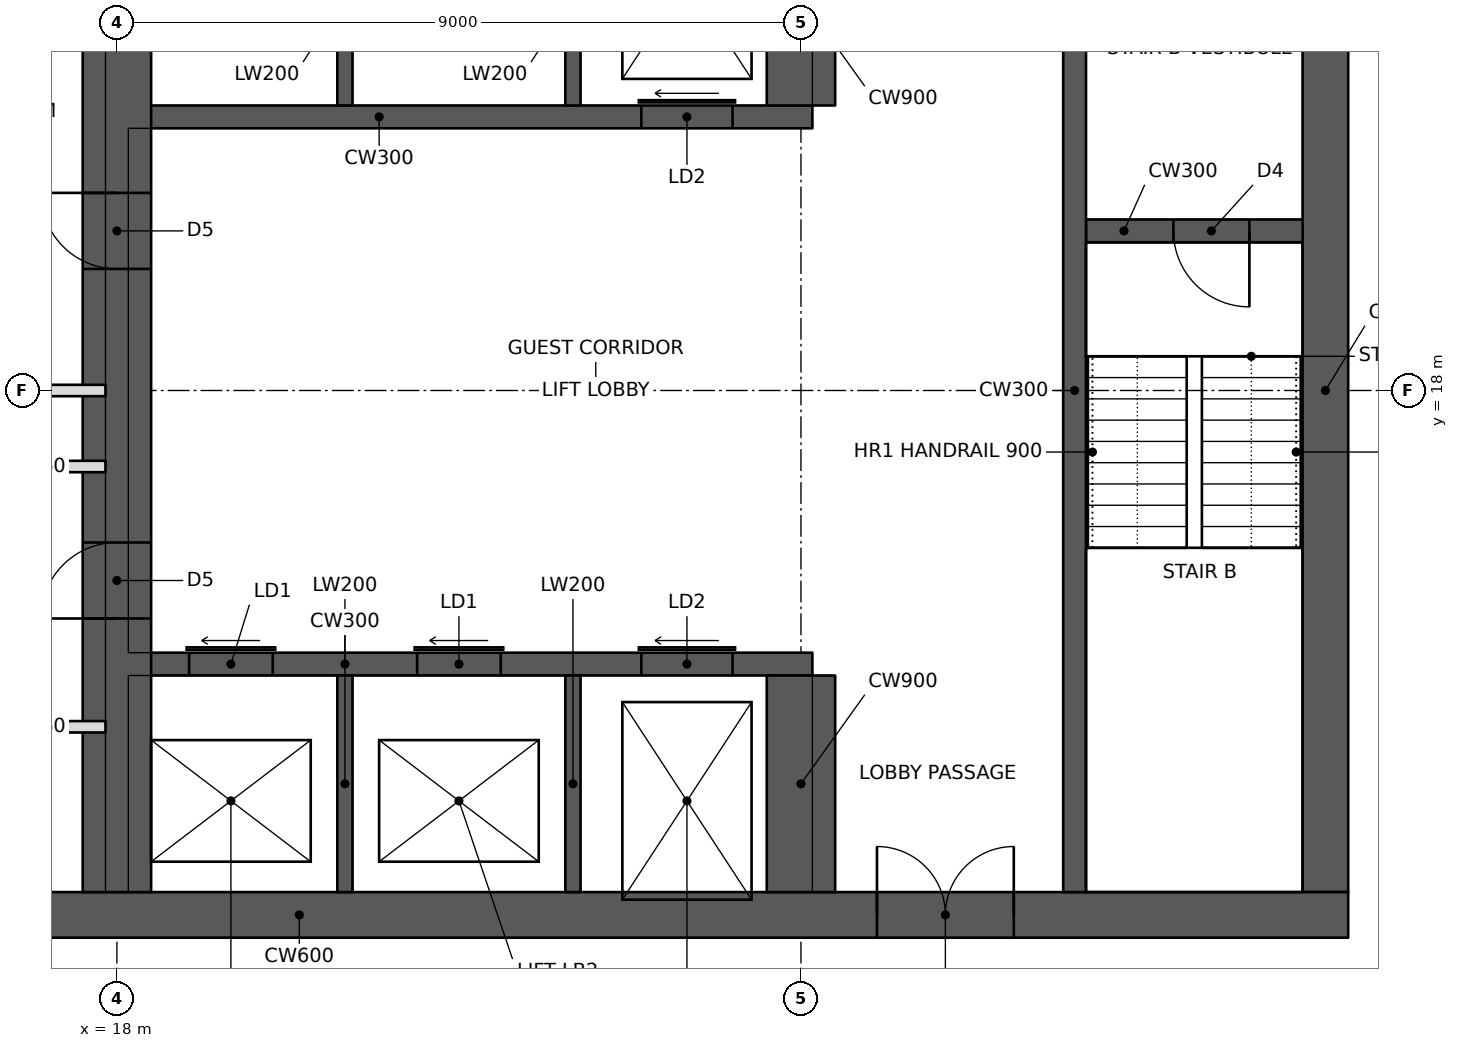
"""IFC4 building model, lengths in metres.
Left out: names, types, materials, properties, quantities, classifications, styles, units other than length and angle.
Written with IfcOpenShell. Run it as: python <this file> out.ifc"""

import sys

from ifc_helpers import new_model, si_unit, direction, frame, frame_2d, origin, place, context, subcontext, project, spatial, rectangle, extrude, element, fill, save


model = new_model("IFC4")
c1 = context("Model", 3, precision=1e-05, world=origin(), true_north=direction((0.0, 1.0)))
c2 = subcontext(c1, "Body", "Model", "MODEL_VIEW")
j1 = project(units=[si_unit("LENGTHUNIT", "METRE"), si_unit("PLANEANGLEUNIT", "RADIAN")], contexts=[c1])
p1 = place(None, origin())
s1 = spatial("IfcSite", under=j1, at=p1, CompositionType="ELEMENT")
p2 = place(p1, origin())
s2 = spatial("IfcBuilding", under=s1, at=p2, CompositionType="ELEMENT")
p3 = place(p2, frame((0.0, 0.0, 152.0)))
s3 = spatial("IfcBuildingStorey", under=s2, at=p3, CompositionType="ELEMENT", Elevation=152.0)
p4 = place(p3, frame((10.8, 11.1, 0.0), z_axis=(0.0, 0.0, 1.0), x_axis=(1.0, 0.0, 0.0)))
e1 = element("IfcWall", 1, at=p4, inside=s3, PredefinedType="SHEAR", context=c2, shape_type="SweptSolid", body=[
    extrude(rectangle(XDim=23.4, YDim=0.6, at=frame_2d((11.7, 0.0))), origin(), (0.0, 0.0, 1.0), 3.4),
])
p5 = place(p4, frame((1.0, 0.0, 0.0)))
e2 = element("IfcOpeningElement", 2, at=p5, cuts=e1, PredefinedType="OPENING", context=c2, shape_type="SweptSolid", body=[
    extrude(rectangle(XDim=1.0, YDim=2.1, at=frame_2d((0.5, 1.05))), frame((0.0, 0.31, 0.0), z_axis=(0.0, -1.0, 0.0), x_axis=(1.0, 0.0, 0.0)), (0.0, 0.0, 1.0), 0.62),
])
p6 = place(p4, frame((17.2, 0.0, 0.0)))
e3 = element("IfcOpeningElement", 3, at=p6, cuts=e1, PredefinedType="OPENING", context=c2, shape_type="SweptSolid", body=[
    extrude(rectangle(XDim=1.8, YDim=2.1, at=frame_2d((0.9, 1.05))), frame((0.0, 0.31, 0.0), z_axis=(0.0, -1.0, 0.0), x_axis=(1.0, 0.0, 0.0)), (0.0, 0.0, 1.0), 0.62),
])
p7 = place(p3, frame((33.9, 11.4, 0.0), z_axis=(0.0, 0.0, 1.0), x_axis=(0.0, 1.0, 0.0)))
e4 = element("IfcWall", 4, at=p7, inside=s3, PredefinedType="SHEAR", context=c2, shape_type="SweptSolid", body=[
    extrude(rectangle(XDim=13.2, YDim=0.6, at=frame_2d((6.6, 0.0))), origin(), (0.0, 0.0, 1.0), 3.4),
])
p8 = place(p3, frame((18.0, 11.4, 0.0), z_axis=(0.0, 0.0, 1.0), x_axis=(0.0, 1.0, 0.0)))
e5 = element("IfcWall", 5, at=p8, inside=s3, PredefinedType="SHEAR", context=c2, shape_type="SweptSolid", body=[
    extrude(rectangle(XDim=13.2, YDim=0.9, at=frame_2d((6.6, 0.0))), origin(), (0.0, 0.0, 1.0), 3.4),
])
p9 = place(p8, frame((3.6, 0.0, 0.0)))
e6 = element("IfcOpeningElement", 6, at=p9, cuts=e5, PredefinedType="OPENING", context=c2, shape_type="SweptSolid", body=[
    extrude(rectangle(XDim=1.0, YDim=2.1, at=frame_2d((0.5, 1.05))), frame((0.0, 0.46, 0.0), z_axis=(0.0, -1.0, 0.0), x_axis=(1.0, 0.0, 0.0)), (0.0, 0.0, 1.0), 0.92),
])
p10 = place(p8, frame((8.2, 0.0, 0.0)))
e7 = element("IfcOpeningElement", 7, at=p10, cuts=e5, PredefinedType="OPENING", context=c2, shape_type="SweptSolid", body=[
    extrude(rectangle(XDim=1.0, YDim=2.1, at=frame_2d((0.5, 1.05))), frame((0.0, 0.46, 0.0), z_axis=(0.0, -1.0, 0.0), x_axis=(1.0, 0.0, 0.0)), (0.0, 0.0, 1.0), 0.92),
])
p11 = place(p3, frame((14.55, 18.0, 0.0), z_axis=(0.0, 0.0, 1.0), x_axis=(1.0, 0.0, 0.0)))
e8 = element("IfcWall", 8, at=p11, inside=s3, PredefinedType="PARTITIONING", context=c2, shape_type="SweptSolid", body=[
    extrude(rectangle(XDim=3.3, YDim=0.15, at=frame_2d((1.65, 0.0))), origin(), (0.0, 0.0, 1.0), 3.15),
])
p12 = place(p3, frame((18.15, 14.4, 0.0), z_axis=(0.0, 0.0, 1.0), x_axis=(1.0, 0.0, 0.0)))
e9 = element("IfcWall", 9, at=p12, inside=s3, PredefinedType="SHEAR", context=c2, shape_type="SweptSolid", body=[
    extrude(rectangle(XDim=9.0, YDim=0.3, at=frame_2d((4.5, 0.0))), origin(), (0.0, 0.0, 1.0), 3.4),
])
p13 = place(p12, frame((0.8, 0.0, 0.0)))
e10 = element("IfcOpeningElement", 10, at=p13, cuts=e9, PredefinedType="OPENING", context=c2, shape_type="SweptSolid", body=[
    extrude(rectangle(XDim=1.1, YDim=2.1, at=frame_2d((0.55, 1.05))), frame((0.0, 0.16, 0.0), z_axis=(0.0, -1.0, 0.0), x_axis=(1.0, 0.0, 0.0)), (0.0, 0.0, 1.0), 0.32),
])
p14 = place(p12, frame((3.8, 0.0, 0.0)))
e11 = element("IfcOpeningElement", 11, at=p14, cuts=e9, PredefinedType="OPENING", context=c2, shape_type="SweptSolid", body=[
    extrude(rectangle(XDim=1.1, YDim=2.1, at=frame_2d((0.55, 1.05))), frame((0.0, 0.16, 0.0), z_axis=(0.0, -1.0, 0.0), x_axis=(1.0, 0.0, 0.0)), (0.0, 0.0, 1.0), 0.32),
])
p15 = place(p12, frame((6.75, 0.0, 0.0)))
e12 = element("IfcOpeningElement", 12, at=p15, cuts=e9, PredefinedType="OPENING", context=c2, shape_type="SweptSolid", body=[
    extrude(rectangle(XDim=1.2, YDim=2.1, at=frame_2d((0.6, 1.05))), frame((0.0, 0.16, 0.0), z_axis=(0.0, -1.0, 0.0), x_axis=(1.0, 0.0, 0.0)), (0.0, 0.0, 1.0), 0.32),
])
p16 = place(p3, frame((27.0, 11.4, 0.0), z_axis=(0.0, 0.0, 1.0), x_axis=(0.0, 1.0, 0.0)))
e13 = element("IfcWall", 13, at=p16, inside=s3, PredefinedType="SHEAR", context=c2, shape_type="SweptSolid", body=[
    extrude(rectangle(XDim=2.85, YDim=0.9, at=frame_2d((1.425, 0.0))), origin(), (0.0, 0.0, 1.0), 3.4),
])
for number, where, z_axis, x_axis in (
    (14, (21.0, 11.4, 0.0), (0.0, 0.0, 1.0), (0.0, 1.0, 0.0)),
    (15, (24.0, 11.4, 0.0), (0.0, 0.0, 1.0), (0.0, 1.0, 0.0)),
):
    element("IfcWall", number, at=place(p3, frame(where, z_axis=z_axis, x_axis=x_axis)), inside=s3, PredefinedType="SHEAR", context=c2, shape_type="SweptSolid", body=[
        extrude(rectangle(XDim=2.85, YDim=0.2, at=frame_2d((1.425, 0.0))), origin(), (0.0, 0.0, 1.0), 3.4),
    ])
p17 = place(p3, frame((18.15, 21.6, 0.0), z_axis=(0.0, 0.0, 1.0), x_axis=(1.0, 0.0, 0.0)))
e16 = element("IfcWall", 16, at=p17, inside=s3, PredefinedType="SHEAR", context=c2, shape_type="SweptSolid", body=[
    extrude(rectangle(XDim=9.0, YDim=0.3, at=frame_2d((4.5, 0.0))), origin(), (0.0, 0.0, 1.0), 3.4),
])
p18 = place(p17, frame((6.75, 0.0, 0.0)))
e17 = element("IfcOpeningElement", 17, at=p18, cuts=e16, PredefinedType="OPENING", context=c2, shape_type="SweptSolid", body=[
    extrude(rectangle(XDim=1.2, YDim=2.1, at=frame_2d((0.6, 1.05))), frame((0.0, 0.16, 0.0), z_axis=(0.0, -1.0, 0.0), x_axis=(1.0, 0.0, 0.0)), (0.0, 0.0, 1.0), 0.32),
])
p19 = place(p3, frame((27.0, 21.75, 0.0), z_axis=(0.0, 0.0, 1.0), x_axis=(0.0, 1.0, 0.0)))
e18 = element("IfcWall", 18, at=p19, inside=s3, PredefinedType="SHEAR", context=c2, shape_type="SweptSolid", body=[
    extrude(rectangle(XDim=2.85, YDim=0.9, at=frame_2d((1.425, 0.0))), origin(), (0.0, 0.0, 1.0), 3.4),
])
for number, where, z_axis, x_axis in (
    (19, (21.0, 21.75, 0.0), (0.0, 0.0, 1.0), (0.0, 1.0, 0.0)),
    (20, (24.0, 21.75, 0.0), (0.0, 0.0, 1.0), (0.0, 1.0, 0.0)),
):
    element("IfcWall", number, at=place(p3, frame(where, z_axis=z_axis, x_axis=x_axis)), inside=s3, PredefinedType="SHEAR", context=c2, shape_type="SweptSolid", body=[
        extrude(rectangle(XDim=2.85, YDim=0.2, at=frame_2d((1.425, 0.0))), origin(), (0.0, 0.0, 1.0), 3.4),
    ])
p20 = place(p3, frame((30.6, 11.4, 0.0), z_axis=(0.0, 0.0, 1.0), x_axis=(0.0, 1.0, 0.0)))
e21 = element("IfcWall", 21, at=p20, inside=s3, PredefinedType="SHEAR", context=c2, shape_type="SweptSolid", body=[
    extrude(rectangle(XDim=13.2, YDim=0.3, at=frame_2d((6.6, 0.0))), origin(), (0.0, 0.0, 1.0), 3.4),
])
p21 = place(p3, frame((30.75, 20.1, 0.0), z_axis=(0.0, 0.0, 1.0), x_axis=(1.0, 0.0, 0.0)))
e22 = element("IfcWall", 22, at=p21, inside=s3, PredefinedType="SHEAR", context=c2, shape_type="SweptSolid", body=[
    extrude(rectangle(XDim=2.85, YDim=0.3, at=frame_2d((1.425, 0.0))), origin(), (0.0, 0.0, 1.0), 3.4),
])
p22 = place(p21, frame((1.15, 0.0, 0.0)))
e23 = element("IfcOpeningElement", 23, at=p22, cuts=e22, PredefinedType="OPENING", context=c2, shape_type="SweptSolid", body=[
    extrude(rectangle(XDim=1.0, YDim=2.1, at=frame_2d((0.5, 1.05))), frame((0.0, 0.16, 0.0), z_axis=(0.0, -1.0, 0.0), x_axis=(1.0, 0.0, 0.0)), (0.0, 0.0, 1.0), 0.32),
])
p23 = place(p3, frame((14.55, 17.0, 0.0), z_axis=(0.0, 0.0, 1.0), x_axis=(1.0, 0.0, 0.0)))
e24 = element("IfcWall", 24, at=p23, inside=s3, PredefinedType="PARTITIONING", context=c2, shape_type="SweptSolid", body=[
    extrude(rectangle(XDim=3.3, YDim=0.15, at=frame_2d((1.65, 0.0))), origin(), (0.0, 0.0, 1.0), 3.15),
])
p24 = place(p23, frame((0.3, 0.0, 0.0)))
e25 = element("IfcOpeningElement", 25, at=p24, cuts=e24, PredefinedType="OPENING", context=c2, shape_type="SweptSolid", body=[
    extrude(rectangle(XDim=1.0, YDim=2.1, at=frame_2d((0.5, 1.05))), frame((0.0, 0.085, 0.0), z_axis=(0.0, -1.0, 0.0), x_axis=(1.0, 0.0, 0.0)), (0.0, 0.0, 1.0), 0.17),
])
p25 = place(p3, frame((14.55, 13.575, 0.0), z_axis=(0.0, 0.0, 1.0), x_axis=(1.0, 0.0, 0.0)))
e26 = element("IfcWall", 26, at=p25, inside=s3, PredefinedType="PARTITIONING", context=c2, shape_type="SweptSolid", body=[
    extrude(rectangle(XDim=3.3, YDim=0.15, at=frame_2d((1.65, 0.0))), origin(), (0.0, 0.0, 1.0), 3.15),
])
p26 = place(p25, frame((0.3, 0.0, 0.0)))
e27 = element("IfcOpeningElement", 27, at=p26, cuts=e26, PredefinedType="OPENING", context=c2, shape_type="SweptSolid", body=[
    extrude(rectangle(XDim=1.0, YDim=2.1, at=frame_2d((0.5, 1.05))), frame((0.0, 0.085, 0.0), z_axis=(0.0, -1.0, 0.0), x_axis=(1.0, 0.0, 0.0)), (0.0, 0.0, 1.0), 0.17),
])
p27 = place(p6, origin())
e28 = element("IfcDoor", 28, at=p27, inside=s3, OperationType="DOUBLE_DOOR_SINGLE_SWING", PredefinedType="DOOR", context=c2, shape_type="SweptSolid", body=[
    extrude(rectangle(XDim=1.8, YDim=2.1, at=frame_2d((0.9, 1.05))), frame((0.0, 0.025, 0.0), z_axis=(0.0, -1.0, 0.0), x_axis=(1.0, 0.0, 0.0)), (0.0, 0.0, 1.0), 0.05),
])
fill(e3, e28)
p28 = place(p22, frame((1.0, 0.0, 0.0), z_axis=(0.0, 0.0, 1.0), x_axis=(-1.0, 0.0, 0.0)))
e29 = element("IfcDoor", 29, at=p28, inside=s3, OperationType="SINGLE_SWING_LEFT", PredefinedType="DOOR", context=c2, shape_type="SweptSolid", body=[
    extrude(rectangle(XDim=1.0, YDim=2.1, at=frame_2d((0.5, 1.05))), frame((0.0, 0.025, 0.0), z_axis=(0.0, -1.0, 0.0), x_axis=(1.0, 0.0, 0.0)), (0.0, 0.0, 1.0), 0.05),
])
fill(e23, e29)
p29 = place(p9, origin())
e30 = element("IfcDoor", 30, at=p29, inside=s3, OperationType="SINGLE_SWING_LEFT", PredefinedType="DOOR", context=c2, shape_type="SweptSolid", body=[
    extrude(rectangle(XDim=1.0, YDim=2.1, at=frame_2d((0.5, 1.05))), frame((0.0, 0.025, 0.0), z_axis=(0.0, -1.0, 0.0), x_axis=(1.0, 0.0, 0.0)), (0.0, 0.0, 1.0), 0.05),
])
fill(e6, e30)
p30 = place(p10, origin())
e31 = element("IfcDoor", 31, at=p30, inside=s3, OperationType="SINGLE_SWING_RIGHT", PredefinedType="DOOR", context=c2, shape_type="SweptSolid", body=[
    extrude(rectangle(XDim=1.0, YDim=2.1, at=frame_2d((0.5, 1.05))), frame((0.0, 0.025, 0.0), z_axis=(0.0, -1.0, 0.0), x_axis=(1.0, 0.0, 0.0)), (0.0, 0.0, 1.0), 0.05),
])
fill(e7, e31)
p31 = place(p13, origin())
e32 = element("IfcDoor", 32, at=p31, inside=s3, OperationType="SLIDING_TO_LEFT", PredefinedType="DOOR", context=c2, shape_type="SweptSolid", body=[
    extrude(rectangle(XDim=1.1, YDim=2.1, at=frame_2d((0.55, 1.05))), frame((0.0, 0.025, 0.0), z_axis=(0.0, -1.0, 0.0), x_axis=(1.0, 0.0, 0.0)), (0.0, 0.0, 1.0), 0.05),
])
fill(e10, e32)
p32 = place(p14, origin())
e33 = element("IfcDoor", 33, at=p32, inside=s3, OperationType="SLIDING_TO_LEFT", PredefinedType="DOOR", context=c2, shape_type="SweptSolid", body=[
    extrude(rectangle(XDim=1.1, YDim=2.1, at=frame_2d((0.55, 1.05))), frame((0.0, 0.025, 0.0), z_axis=(0.0, -1.0, 0.0), x_axis=(1.0, 0.0, 0.0)), (0.0, 0.0, 1.0), 0.05),
])
fill(e11, e33)
p33 = place(p15, origin())
e34 = element("IfcDoor", 34, at=p33, inside=s3, OperationType="SLIDING_TO_LEFT", PredefinedType="DOOR", context=c2, shape_type="SweptSolid", body=[
    extrude(rectangle(XDim=1.2, YDim=2.1, at=frame_2d((0.6, 1.05))), frame((0.0, 0.025, 0.0), z_axis=(0.0, -1.0, 0.0), x_axis=(1.0, 0.0, 0.0)), (0.0, 0.0, 1.0), 0.05),
])
fill(e12, e34)
p34 = place(p18, origin())
e35 = element("IfcDoor", 35, at=p34, inside=s3, OperationType="SLIDING_TO_LEFT", PredefinedType="DOOR", context=c2, shape_type="SweptSolid", body=[
    extrude(rectangle(XDim=1.2, YDim=2.1, at=frame_2d((0.6, 1.05))), frame((0.0, 0.025, 0.0), z_axis=(0.0, -1.0, 0.0), x_axis=(1.0, 0.0, 0.0)), (0.0, 0.0, 1.0), 0.05),
])
fill(e17, e35)
save(model, sys.argv[1])
